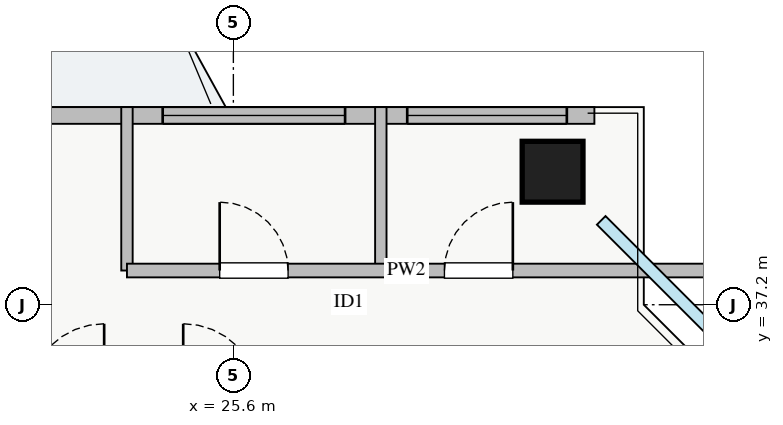
"""IFC4 building model, lengths in metres.
Left out: names, types, materials, properties, quantities, classifications, styles, units other than length and angle.
Written with IfcOpenShell. Run it as: python <this file> out.ifc"""

import sys

from ifc_helpers import new_model, si_unit, direction, frame, frame_2d, origin, origin_2d, place, context, subcontext, project, spatial, rectangle, extrude, source, transform, mapped, element, fill, save


model = new_model("IFC4")
c1 = context("Model", 3, precision=1e-05, world=origin(), true_north=direction((0.0, 1.0)))
c2 = subcontext(c1, "Body", "Model", "MODEL_VIEW")
j1 = project(units=[si_unit("LENGTHUNIT", "METRE"), si_unit("PLANEANGLEUNIT", "RADIAN")], contexts=[c1])
p1 = place(None, origin())
s1 = spatial("IfcSite", under=j1, at=p1, CompositionType="ELEMENT")
p2 = place(p1, origin())
s2 = spatial("IfcBuilding", under=s1, at=p2, CompositionType="ELEMENT")
p3 = place(p2, frame((0.0, 0.0, 210.0)))
s3 = spatial("IfcBuildingStorey", under=s2, at=p3, CompositionType="ELEMENT", Elevation=210.0)
m1 = source(origin(), c2, "Body", "SweptSolid", [
    extrude(rectangle(XDim=0.8, YDim=0.8, at=origin_2d()), origin(), (0.0, 0.0, 1.0), 3.25),
])
p4 = place(p3, frame((29.8, 38.95, 0.0), z_axis=(0.0, 0.0, 1.0), x_axis=(1.0, 0.0, 0.0)))
e1 = element("IfcColumn", 1, at=p4, inside=s3, PredefinedType="COLUMN", context=c2, shape_type="MappedRepresentation", body=[
    mapped(m1, transform((0.0, 0.0, 0.0), x_axis=(1.0, 0.0, 0.0), y_axis=(0.0, 1.0, 0.0), z_axis=(0.0, 0.0, 1.0), scale=1.0)),
])
p5 = place(p3, frame((7.65, 39.69, 0.0), z_axis=(0.0, 0.0, 1.0), x_axis=(1.0, 0.0, 0.0)))
e2 = element("IfcWall", 2, at=p5, inside=s3, PredefinedType="STANDARD", context=c2, shape_type="SweptSolid", body=[
    extrude(rectangle(XDim=22.7, YDim=0.22, at=frame_2d((11.35, 0.0))), origin(), (0.0, 0.0, 1.0), 2.61),
])
p6 = place(p5, frame((12.2, 0.0, 0.0)))
e3 = element("IfcOpeningElement", 3, at=p6, cuts=e2, PredefinedType="OPENING", context=c2, shape_type="SweptSolid", body=[
    extrude(rectangle(XDim=1.2, YDim=2.1, at=frame_2d((0.6, 1.05))), frame((0.0, 0.12, 0.0), z_axis=(0.0, -1.0, 0.0), x_axis=(1.0, 0.0, 0.0)), (0.0, 0.0, 1.0), 0.24),
])
p7 = place(p5, frame((1.637, 0.0, 0.9)))
e4 = element("IfcOpeningElement", 4, at=p7, cuts=e2, PredefinedType="OPENING", context=c2, shape_type="SweptSolid", body=[
    extrude(rectangle(XDim=2.4, YDim=1.48, at=frame_2d((1.2, 0.74))), frame((0.0, 0.12, 0.0), z_axis=(0.0, -1.0, 0.0), x_axis=(1.0, 0.0, 0.0)), (0.0, 0.0, 1.0), 0.24),
])
p8 = place(p5, frame((7.612, 0.0, 0.9)))
e5 = element("IfcOpeningElement", 5, at=p8, cuts=e2, PredefinedType="OPENING", context=c2, shape_type="SweptSolid", body=[
    extrude(rectangle(XDim=1.8, YDim=1.45, at=frame_2d((0.9, 0.725))), frame((0.0, 0.12, 0.0), z_axis=(0.0, -1.0, 0.0), x_axis=(1.0, 0.0, 0.0)), (0.0, 0.0, 1.0), 0.24),
])
p9 = place(p5, frame((20.238, 0.0, 0.9)))
e6 = element("IfcOpeningElement", 6, at=p9, cuts=e2, PredefinedType="OPENING", context=c2, shape_type="SweptSolid", body=[
    extrude(rectangle(XDim=2.1, YDim=1.5, at=frame_2d((1.05, 0.75))), frame((0.0, 0.12, 0.0), z_axis=(0.0, -1.0, 0.0), x_axis=(1.0, 0.0, 0.0)), (0.0, 0.0, 1.0), 0.24),
])
p10 = place(p5, frame((17.02, 0.0, 0.9)))
e7 = element("IfcOpeningElement", 7, at=p10, cuts=e2, PredefinedType="OPENING", context=c2, shape_type="SweptSolid", body=[
    extrude(rectangle(XDim=2.4, YDim=1.5, at=frame_2d((1.2, 0.75))), frame((0.0, 0.12, 0.0), z_axis=(0.0, -1.0, 0.0), x_axis=(1.0, 0.0, 0.0)), (0.0, 0.0, 1.0), 0.24),
])
for number, where, z_axis, x_axis in (
    (8, (24.2, 37.65, 0.0), (0.0, 0.0, 1.0), (0.0, 1.0, 0.0)),
    (9, (27.54, 37.65, 0.0), (0.0, 0.0, 1.0), (0.0, 1.0, 0.0)),
):
    element("IfcWall", number, at=place(p3, frame(where, z_axis=z_axis, x_axis=x_axis)), inside=s3, PredefinedType="PARTITIONING", context=c2, shape_type="SweptSolid", body=[
        extrude(rectangle(XDim=2.15, YDim=0.15, at=frame_2d((1.075, 0.0))), origin(), (0.0, 0.0, 1.0), 3.07),
    ])
p11 = place(p3, frame((24.2, 37.65, 0.0), z_axis=(0.0, 0.0, 1.0), x_axis=(1.0, 0.0, 0.0)))
e10 = element("IfcWall", 10, at=p11, inside=s3, PredefinedType="PARTITIONING", context=c2, shape_type="SweptSolid", body=[
    extrude(rectangle(XDim=8.25, YDim=0.18, at=frame_2d((4.125, 0.0))), origin(), (0.0, 0.0, 1.0), 3.07),
])
p12 = place(p11, frame((1.22, 0.0, 0.0)))
e11 = element("IfcOpeningElement", 11, at=p12, cuts=e10, PredefinedType="OPENING", context=c2, shape_type="SweptSolid", body=[
    extrude(rectangle(XDim=0.9, YDim=2.05, at=frame_2d((0.45, 1.025))), frame((0.0, 0.1, 0.0), z_axis=(0.0, -1.0, 0.0), x_axis=(1.0, 0.0, 0.0)), (0.0, 0.0, 1.0), 0.2),
])
p13 = place(p11, frame((4.177, 0.0, 0.0)))
e12 = element("IfcOpeningElement", 12, at=p13, cuts=e10, PredefinedType="OPENING", context=c2, shape_type="SweptSolid", body=[
    extrude(rectangle(XDim=0.9, YDim=2.05, at=frame_2d((0.45, 1.025))), frame((0.0, 0.1, 0.0), z_axis=(0.0, -1.0, 0.0), x_axis=(1.0, 0.0, 0.0)), (0.0, 0.0, 1.0), 0.2),
])
m2 = source(origin(), c2, "Body", "SweptSolid", [
    extrude(rectangle(XDim=2.1, YDim=1.5, at=frame_2d((1.05, 0.75))), frame((0.0, 0.03, 0.0), z_axis=(0.0, -1.0, 0.0), x_axis=(1.0, 0.0, 0.0)), (0.0, 0.0, 1.0), 0.06),
])
p14 = place(p9, origin())
e13 = element("IfcWindow", 13, at=p14, inside=s3, PartitioningType="TRIPLE_PANEL_VERTICAL", PredefinedType="WINDOW", context=c2, shape_type="MappedRepresentation", body=[
    mapped(m2, transform((0.0, 0.0, 0.0), x_axis=(1.0, 0.0, 0.0), y_axis=(0.0, 1.0, 0.0), z_axis=(0.0, 0.0, 1.0), scale=1.0)),
])
fill(e6, e13)
m3 = source(origin(), c2, "Body", "SweptSolid", [
    extrude(rectangle(XDim=0.9, YDim=2.05, at=frame_2d((0.45, 1.025))), frame((0.0, 0.025, 0.0), z_axis=(0.0, -1.0, 0.0), x_axis=(1.0, 0.0, 0.0)), (0.0, 0.0, 1.0), 0.05),
])
p15 = place(p12, origin())
e14 = element("IfcDoor", 14, at=p15, inside=s3, OperationType="SINGLE_SWING_LEFT", PredefinedType="DOOR", context=c2, shape_type="MappedRepresentation", body=[
    mapped(m3, transform((0.0, 0.0, 0.0), x_axis=(1.0, 0.0, 0.0), y_axis=(0.0, 1.0, 0.0), z_axis=(0.0, 0.0, 1.0), scale=1.0)),
])
fill(e11, e14)
p16 = place(p13, origin())
e15 = element("IfcDoor", 15, at=p16, inside=s3, OperationType="SINGLE_SWING_RIGHT", PredefinedType="DOOR", context=c2, shape_type="MappedRepresentation", body=[
    mapped(m3, transform((0.0, 0.0, 0.0), x_axis=(1.0, 0.0, 0.0), y_axis=(0.0, 1.0, 0.0), z_axis=(0.0, 0.0, 1.0), scale=1.0)),
])
fill(e12, e15)
m4 = source(origin(), c2, "Body", "SweptSolid", [
    extrude(rectangle(XDim=2.4, YDim=1.5, at=frame_2d((1.2, 0.75))), frame((0.0, 0.03, 0.0), z_axis=(0.0, -1.0, 0.0), x_axis=(1.0, 0.0, 0.0)), (0.0, 0.0, 1.0), 0.06),
])
p17 = place(p10, origin())
e16 = element("IfcWindow", 16, at=p17, inside=s3, PartitioningType="TRIPLE_PANEL_VERTICAL", PredefinedType="WINDOW", context=c2, shape_type="MappedRepresentation", body=[
    mapped(m4, transform((0.0, 0.0, 0.0), x_axis=(1.0, 0.0, 0.0), y_axis=(0.0, 1.0, 0.0), z_axis=(0.0, 0.0, 1.0), scale=1.0)),
])
fill(e7, e16)
save(model, sys.argv[1])
